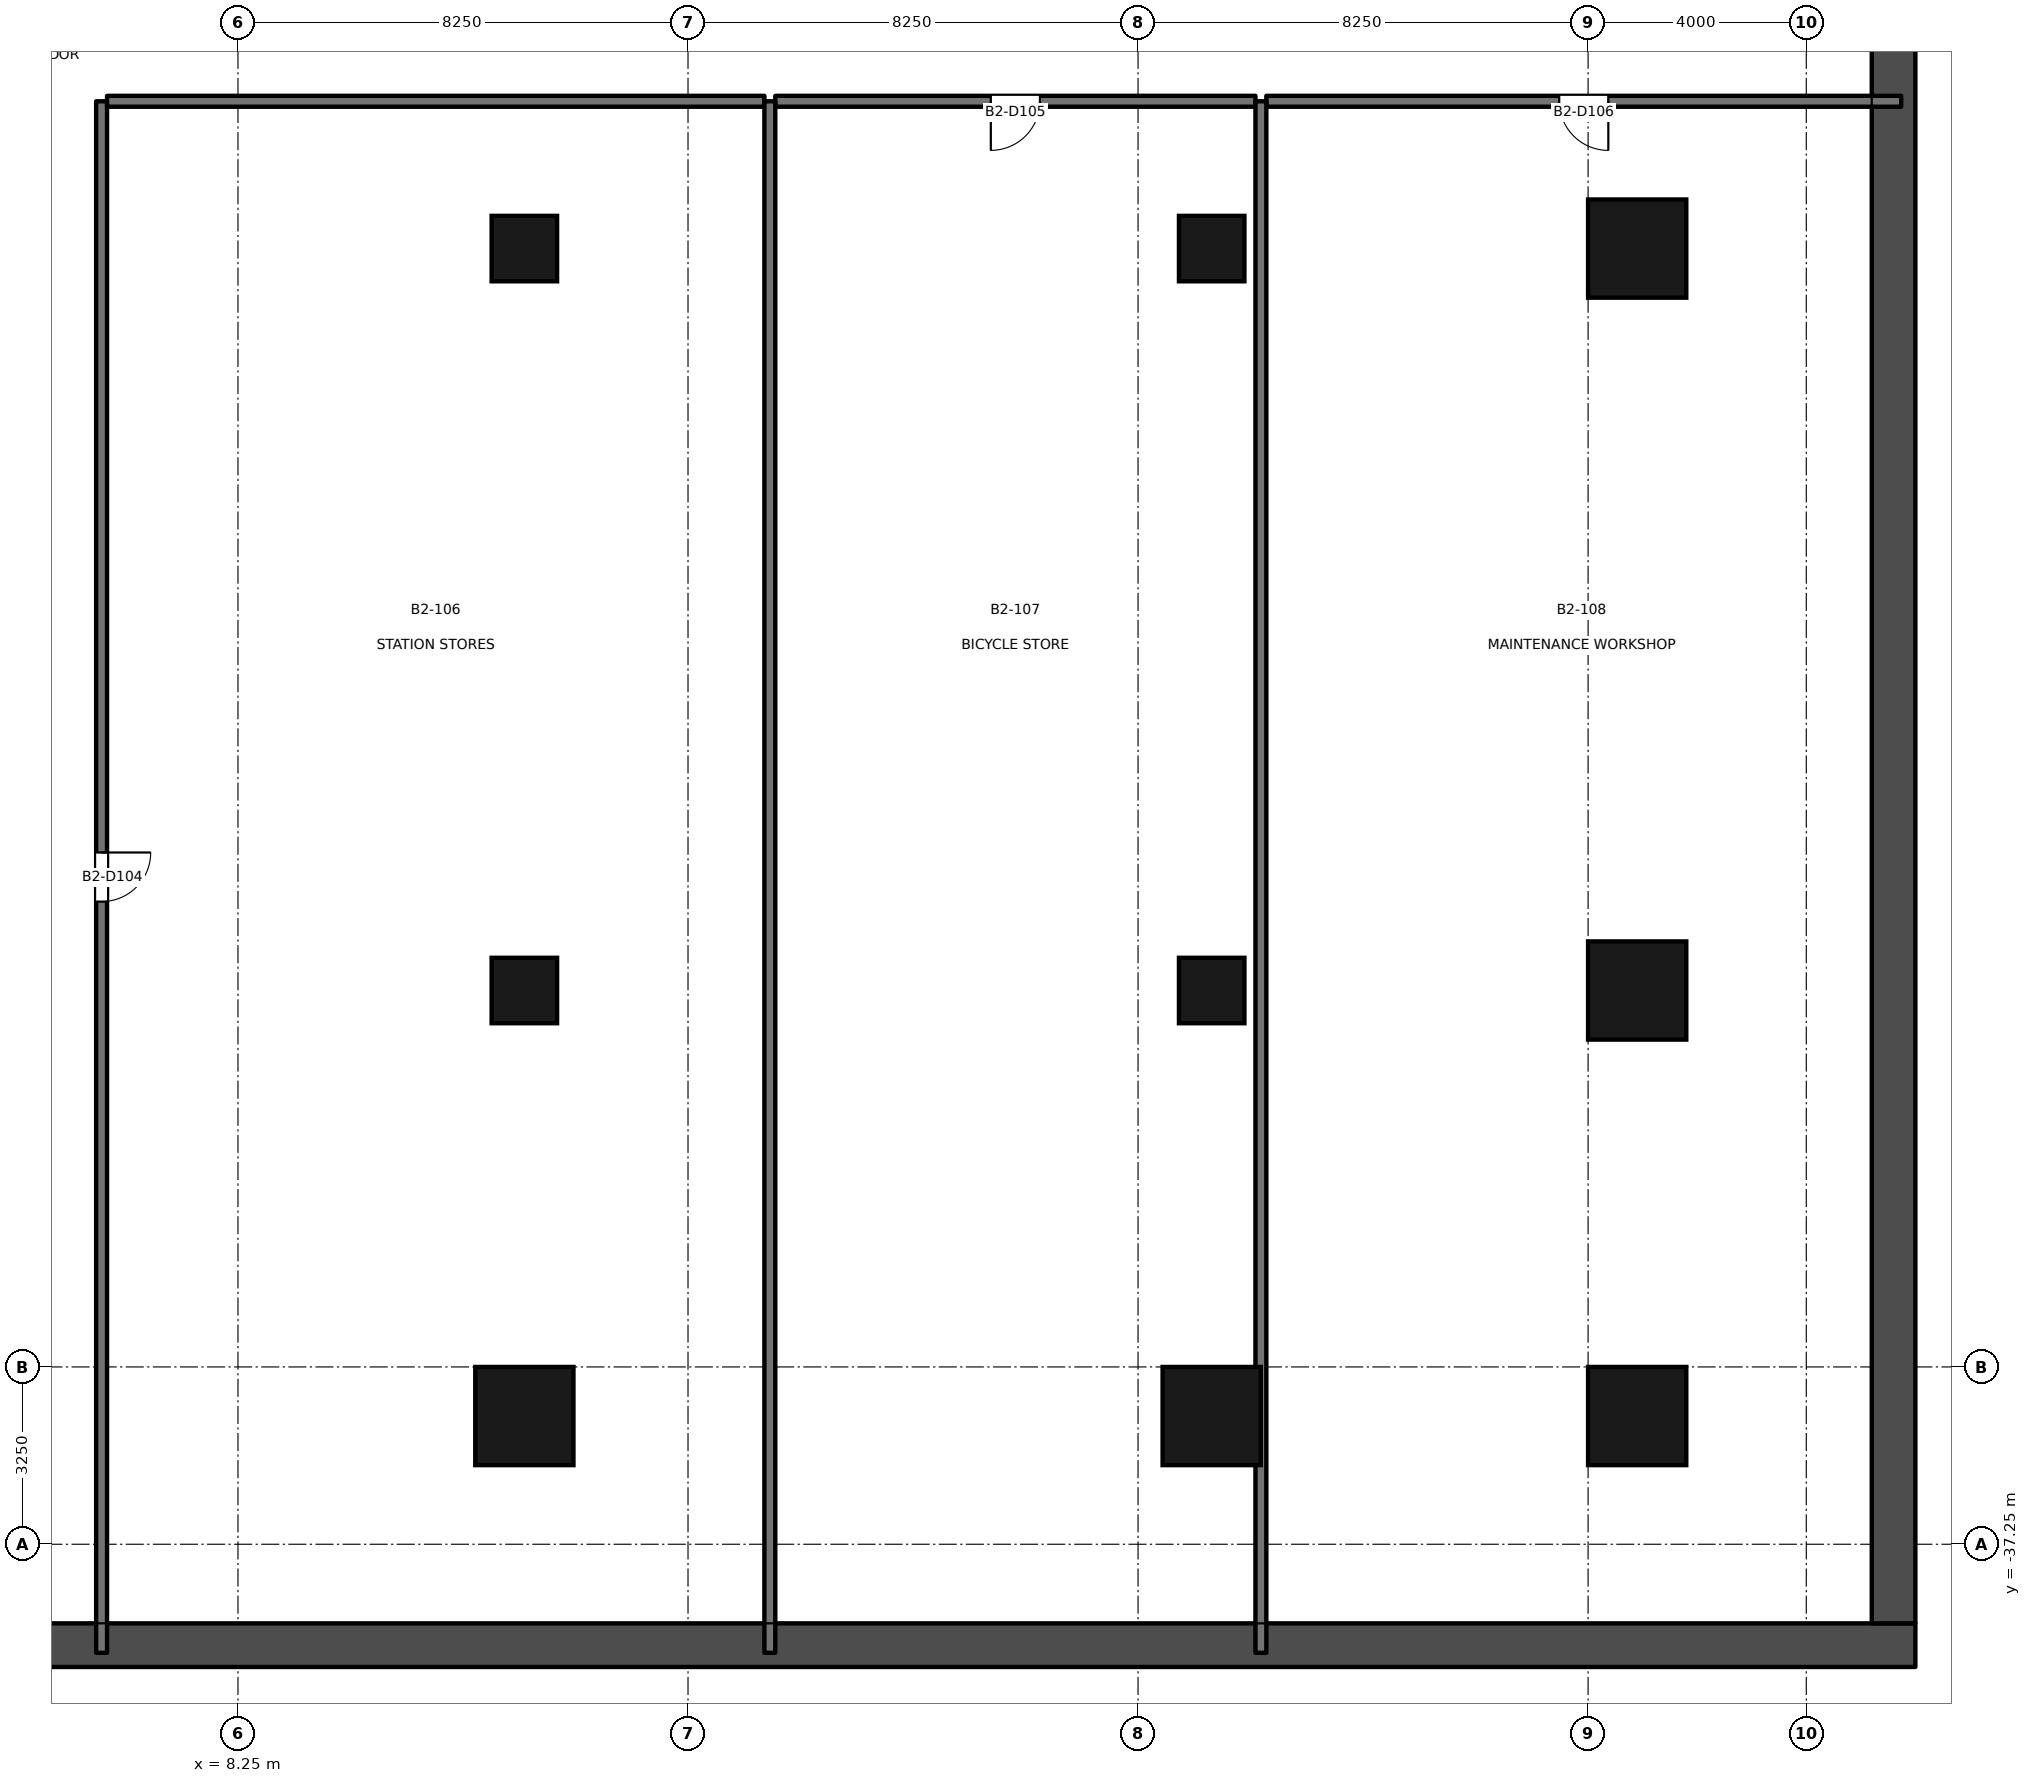
"""IFC4 building model, lengths in metres.
Left out: names, types, materials, properties, quantities, classifications, styles, units other than length and angle.
Written with IfcOpenShell. Run it as: python <this file> out.ifc"""

import sys

from ifc_helpers import new_model, si_unit, direction, frame, frame_2d, origin, origin_2d, place, context, subcontext, project, spatial, rectangle, extrude, element, fill, save


model = new_model("IFC4")
c1 = context("Model", 3, precision=1e-05, world=origin(), true_north=direction((0.0, 1.0)))
c2 = subcontext(c1, "Body", "Model", "MODEL_VIEW")
j1 = project(units=[si_unit("LENGTHUNIT", "METRE"), si_unit("PLANEANGLEUNIT", "RADIAN")], contexts=[c1])
p1 = place(None, origin())
s1 = spatial("IfcSite", under=j1, at=p1, CompositionType="ELEMENT")
p2 = place(p1, origin())
s2 = spatial("IfcBuilding", under=s1, at=p2, CompositionType="ELEMENT")
p3 = place(p2, frame((0.0, 0.0, -9.5)))
s3 = spatial("IfcBuildingStorey", under=s2, at=p3, CompositionType="ELEMENT", Elevation=-9.5)
p4 = place(p3, frame((-39.0, -39.1, -0.2), z_axis=(0.0, 0.0, 1.0), x_axis=(1.0, 0.0, 0.0)))
e1 = element("IfcWall", 1, at=p4, inside=s3, PredefinedType="SOLIDWALL", context=c2, shape_type="SweptSolid", body=[
    extrude(rectangle(XDim=78.0, YDim=0.8, at=frame_2d((39.0, 0.0))), origin(), (0.0, 0.0, 1.0), 4.0),
])
p5 = place(p3, frame((38.6, -38.7, -0.2), z_axis=(0.0, 0.0, 1.0), x_axis=(0.0, 1.0, 0.0)))
e2 = element("IfcWall", 2, at=p5, inside=s3, PredefinedType="SOLIDWALL", context=c2, shape_type="SweptSolid", body=[
    extrude(rectangle(XDim=51.9, YDim=0.8, at=frame_2d((25.95, 0.0))), origin(), (0.0, 0.0, 1.0), 4.0),
])
for number, where, z_axis, x_axis in (
    (3, (33.9, -34.9, -0.2), (0.0, 0.0, 1.0), (1.0, 0.0, 0.0)),
    (4, (13.5, -34.9, -0.2), (0.0, 0.0, 1.0), (1.0, 0.0, 0.0)),
    (5, (26.1, -34.9, -0.2), (0.0, 0.0, 1.0), (1.0, 0.0, 0.0)),
    (6, (33.9, -27.1, -0.2), (0.0, 0.0, 1.0), (0.0, 1.0, 0.0)),
    (7, (33.9, -13.5, -0.2), (0.0, 0.0, 1.0), (0.0, 1.0, 0.0)),
):
    element("IfcColumn", number, at=place(p3, frame(where, z_axis=z_axis, x_axis=x_axis)), inside=s3, PredefinedType="COLUMN", context=c2, shape_type="SweptSolid", body=[
        extrude(rectangle(XDim=1.8, YDim=1.8, at=origin_2d()), origin(), (0.0, 0.0, 1.0), 4.0),
    ])
for number, where, z_axis, x_axis in (
    (8, (13.5, -27.1, -0.2), (0.0, 0.0, 1.0), (1.0, 0.0, 0.0)),
    (9, (26.1, -27.1, -0.2), (0.0, 0.0, 1.0), (1.0, 0.0, 0.0)),
    (10, (13.5, -13.5, -0.2), (0.0, 0.0, 1.0), (1.0, 0.0, 0.0)),
    (11, (26.1, -13.5, -0.2), (0.0, 0.0, 1.0), (1.0, 0.0, 0.0)),
):
    element("IfcColumn", number, at=place(p3, frame(where, z_axis=z_axis, x_axis=x_axis)), inside=s3, PredefinedType="COLUMN", context=c2, shape_type="SweptSolid", body=[
        extrude(rectangle(XDim=1.2, YDim=1.2, at=origin_2d()), origin(), (0.0, 0.0, 1.0), 4.0),
    ])
p6 = place(p3, frame((5.75, -10.8, 0.0), z_axis=(0.0, 0.0, 1.0), x_axis=(0.0, -1.0, 0.0)))
e12 = element("IfcWall", 12, at=p6, inside=s3, PredefinedType="PARTITIONING", context=c2, shape_type="SweptSolid", body=[
    extrude(rectangle(XDim=28.44, YDim=0.2, at=frame_2d((14.22, 0.0))), origin(), (0.0, 0.0, 1.0), 2.8),
])
p7 = place(p6, frame((13.77, 0.0, 0.0)))
e13 = element("IfcOpeningElement", 13, at=p7, cuts=e12, PredefinedType="OPENING", context=c2, shape_type="SweptSolid", body=[
    extrude(rectangle(XDim=0.9, YDim=2.1, at=frame_2d((0.45, 1.05))), frame((0.0, 0.111, 0.0), z_axis=(0.0, -1.0, 0.0), x_axis=(1.0, 0.0, 0.0)), (0.0, 0.0, 1.0), 0.221),
])
p8 = place(p3, frame((17.9, -10.8, 0.0), z_axis=(0.0, 0.0, 1.0), x_axis=(-1.0, 0.0, 0.0)))
e14 = element("IfcWall", 14, at=p8, inside=s3, PredefinedType="PARTITIONING", context=c2, shape_type="SweptSolid", body=[
    extrude(rectangle(XDim=12.05, YDim=0.2, at=frame_2d((6.025, 0.0))), origin(), (0.0, 0.0, 1.0), 2.4),
])
p9 = place(p3, frame((26.902, -10.8, 0.0), z_axis=(0.0, 0.0, 1.0), x_axis=(-1.0, 0.0, 0.0)))
e15 = element("IfcWall", 15, at=p9, inside=s3, PredefinedType="PARTITIONING", context=c2, shape_type="SweptSolid", body=[
    extrude(rectangle(XDim=8.802, YDim=0.2, at=frame_2d((4.401, 0.0))), origin(), (0.0, 0.0, 1.0), 2.6),
])
p10 = place(p9, frame((3.951, 0.0, 0.0)))
e16 = element("IfcOpeningElement", 16, at=p10, cuts=e15, PredefinedType="OPENING", context=c2, shape_type="SweptSolid", body=[
    extrude(rectangle(XDim=0.9, YDim=2.1, at=frame_2d((0.45, 1.05))), frame((0.0, 0.111, 0.0), z_axis=(0.0, -1.0, 0.0), x_axis=(1.0, 0.0, 0.0)), (0.0, 0.0, 1.0), 0.221),
])
p11 = place(p3, frame((38.74, -10.8, 0.0), z_axis=(0.0, 0.0, 1.0), x_axis=(-1.0, 0.0, 0.0)))
e17 = element("IfcWall", 17, at=p11, inside=s3, PredefinedType="PARTITIONING", context=c2, shape_type="SweptSolid", body=[
    extrude(rectangle(XDim=11.638, YDim=0.2, at=frame_2d((5.819, 0.0))), origin(), (0.0, 0.0, 1.0), 2.8),
])
p12 = place(p11, frame((5.369, 0.0, 0.0)))
e18 = element("IfcOpeningElement", 18, at=p12, cuts=e17, PredefinedType="OPENING", context=c2, shape_type="SweptSolid", body=[
    extrude(rectangle(XDim=0.9, YDim=2.1, at=frame_2d((0.45, 1.05))), frame((0.0, 0.111, 0.0), z_axis=(0.0, -1.0, 0.0), x_axis=(1.0, 0.0, 0.0)), (0.0, 0.0, 1.0), 0.221),
])
for number, where, z_axis, x_axis in (
    (19, (18.0, -10.8, 0.0), (0.0, 0.0, 1.0), (0.0, -1.0, 0.0)),
    (20, (27.002, -10.8, 0.0), (0.0, 0.0, 1.0), (0.0, -1.0, 0.0)),
):
    element("IfcWall", number, at=place(p3, frame(where, z_axis=z_axis, x_axis=x_axis)), inside=s3, PredefinedType="PARTITIONING", context=c2, shape_type="SweptSolid", body=[
        extrude(rectangle(XDim=28.44, YDim=0.2, at=frame_2d((14.22, 0.0))), origin(), (0.0, 0.0, 1.0), 2.8),
    ])
p13 = place(p7, origin())
e21 = element("IfcDoor", 21, at=p13, inside=s3, OperationType="SINGLE_SWING_LEFT", PredefinedType="DOOR", context=c2, shape_type="SweptSolid", body=[
    extrude(rectangle(XDim=0.9, YDim=2.1, at=frame_2d((0.45, 1.05))), frame((0.0, 0.025, 0.0), z_axis=(0.0, -1.0, 0.0), x_axis=(1.0, 0.0, 0.0)), (0.0, 0.0, 1.0), 0.05),
])
fill(e13, e21)
p14 = place(p10, origin())
e22 = element("IfcDoor", 22, at=p14, inside=s3, OperationType="SINGLE_SWING_RIGHT", PredefinedType="DOOR", context=c2, shape_type="SweptSolid", body=[
    extrude(rectangle(XDim=0.9, YDim=2.1, at=frame_2d((0.45, 1.05))), frame((0.0, 0.025, 0.0), z_axis=(0.0, -1.0, 0.0), x_axis=(1.0, 0.0, 0.0)), (0.0, 0.0, 1.0), 0.05),
])
fill(e16, e22)
p15 = place(p12, origin())
e23 = element("IfcDoor", 23, at=p15, inside=s3, OperationType="SINGLE_SWING_LEFT", PredefinedType="DOOR", context=c2, shape_type="SweptSolid", body=[
    extrude(rectangle(XDim=0.9, YDim=2.1, at=frame_2d((0.45, 1.05))), frame((0.0, 0.025, 0.0), z_axis=(0.0, -1.0, 0.0), x_axis=(1.0, 0.0, 0.0)), (0.0, 0.0, 1.0), 0.05),
])
fill(e18, e23)
save(model, sys.argv[1])
